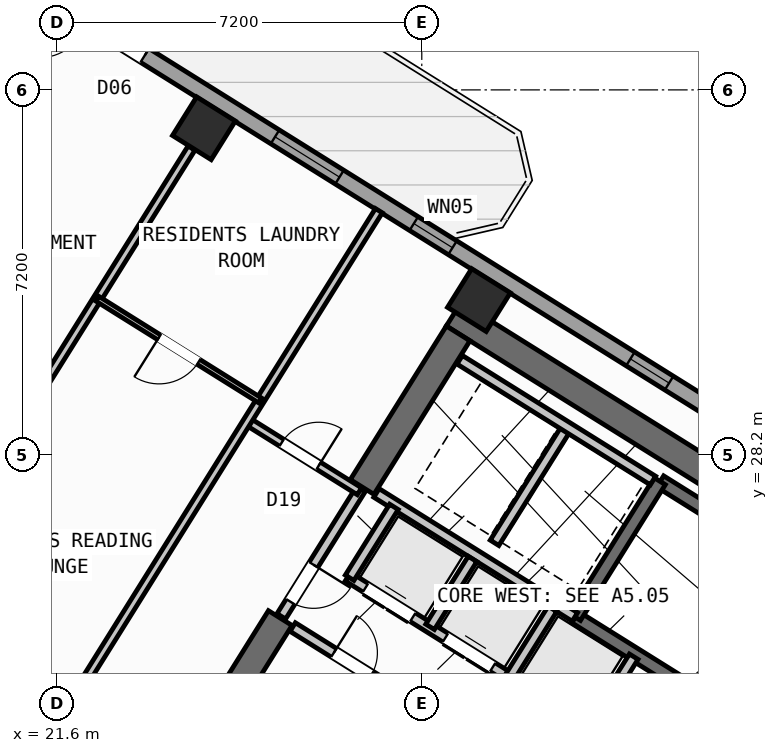
"""IFC4 building model, lengths in metres.
Left out: names, types, materials, properties, quantities, classifications, styles, units other than length and angle.
Written with IfcOpenShell. Run it as: python <this file> out.ifc"""

import sys

from ifc_helpers import new_model, si_unit, direction, frame, frame_2d, origin, origin_2d, place, context, subcontext, project, spatial, rectangle, hollow_rectangle, extrude, source, transform, mapped, element, fill, save


model = new_model("IFC4")
c1 = context("Model", 3, precision=1e-05, world=origin(), true_north=direction((0.0, 1.0)))
c2 = subcontext(c1, "Body", "Model", "MODEL_VIEW")
j1 = project(units=[si_unit("LENGTHUNIT", "METRE"), si_unit("PLANEANGLEUNIT", "RADIAN")], contexts=[c1])
p1 = place(None, origin())
s1 = spatial("IfcSite", under=j1, at=p1, CompositionType="ELEMENT")
p2 = place(p1, origin())
s2 = spatial("IfcBuilding", under=s1, at=p2, CompositionType="ELEMENT")
p3 = place(p2, frame((0.0, 0.0, 158.7)))
s3 = spatial("IfcBuildingStorey", under=s2, at=p3, CompositionType="ELEMENT", Elevation=158.7)
p4 = place(p3, frame((40.573, 24.01, 0.0), z_axis=(0.0, 0.0, 1.0), x_axis=(-0.848047359947, 0.529920442413, 0.0)))
e1 = element("IfcWall", 1, at=p4, inside=s3, PredefinedType="SHEAR", context=c2, shape_type="SweptSolid", body=[
    extrude(rectangle(XDim=13.14, YDim=0.55, at=frame_2d((6.57, 0.0))), origin(), (0.0, 0.0, 1.0), 3.35),
])
p5 = place(p3, frame((29.517, 30.594, 0.0), z_axis=(0.0, 0.0, 1.0), x_axis=(-0.529906864564, -0.848055844204, 0.0)))
e2 = element("IfcWall", 2, at=p5, inside=s3, PredefinedType="SHEAR", context=c2, shape_type="SweptSolid", body=[
    extrude(rectangle(XDim=3.575, YDim=0.55, at=frame_2d((1.788, 0.0))), origin(), (0.0, 0.0, 1.0), 3.35),
])
p6 = place(p3, frame((26.007, 24.976, 0.0), z_axis=(0.0, 0.0, 1.0), x_axis=(-0.529923795287, -0.848045264823, 0.0)))
e3 = element("IfcWall", 3, at=p6, inside=s3, PredefinedType="SHEAR", context=c2, shape_type="SweptSolid", body=[
    extrude(rectangle(XDim=6.425, YDim=0.55, at=frame_2d((3.212, 0.0))), origin(), (0.0, 0.0, 1.0), 3.35),
])
m1 = source(origin(), c2, "Body", "SweptSolid", [
    extrude(hollow_rectangle(XDim=0.9, YDim=0.9, WallThickness=0.036, at=origin_2d()), origin(), (0.0, 0.0, 1.0), 3.6),
])
for number, where, z_axis, x_axis in (
    (4, (29.928, 31.251, 0.0), (0.0, 0.0, 1.0), (-0.848, 0.53, 0.0)),
    (5, (24.5, 34.643, 0.0), (0.0, 0.0, 1.0), (-0.848, 0.53, 0.0)),
):
    element("IfcColumn", number, at=place(p3, frame(where, z_axis=z_axis, x_axis=x_axis)), inside=s3, PredefinedType="COLUMN", context=c2, shape_type="MappedRepresentation", body=[
        mapped(m1, transform((0.0, 0.0, 0.0), scale=1.0)),
    ])
p7 = place(p3, frame((14.138, 41.825, 0.0), z_axis=(0.0, 0.0, 1.0), x_axis=(0.848046498049, -0.529921821731, 0.0)))
e6 = element("IfcWall", 6, at=p7, inside=s3, PredefinedType="STANDARD", context=c2, shape_type="SweptSolid", body=[
    extrude(rectangle(XDim=31.588, YDim=0.32, at=frame_2d((15.794, 0.0))), origin(), (0.0, 0.0, 1.0), 3.35),
])
p8 = place(p7, frame((9.792, 0.0, 0.0)))
e7 = element("IfcOpeningElement", 7, at=p8, cuts=e6, PredefinedType="OPENING", context=c2, shape_type="SweptSolid", body=[
    extrude(rectangle(XDim=1.05, YDim=2.15, at=frame_2d((0.525, 1.075))), frame((0.0, 0.17, 0.0), z_axis=(0.0, -1.0, 0.0), x_axis=(1.0, 0.0, 0.0)), (0.0, 0.0, 1.0), 0.34),
])
p9 = place(p7, frame((0.791, 0.0, 0.85)))
e8 = element("IfcOpeningElement", 8, at=p9, cuts=e6, PredefinedType="OPENING", context=c2, shape_type="SweptSolid", body=[
    extrude(rectangle(XDim=1.8, YDim=1.5, at=frame_2d((0.9, 0.75))), frame((0.0, 0.17, 0.0), z_axis=(0.0, -1.0, 0.0), x_axis=(1.0, 0.0, 0.0)), (0.0, 0.0, 1.0), 0.34),
])
p10 = place(p7, frame((3.996, 0.0, 0.95)))
e9 = element("IfcOpeningElement", 9, at=p10, cuts=e6, PredefinedType="OPENING", context=c2, shape_type="SweptSolid", body=[
    extrude(rectangle(XDim=1.2, YDim=1.4, at=frame_2d((0.6, 0.7))), frame((0.0, 0.17, 0.0), z_axis=(0.0, -1.0, 0.0), x_axis=(1.0, 0.0, 0.0)), (0.0, 0.0, 1.0), 0.34),
])
p11 = place(p7, frame((13.874, 0.0, 0.85)))
e10 = element("IfcOpeningElement", 10, at=p11, cuts=e6, PredefinedType="OPENING", context=c2, shape_type="SweptSolid", body=[
    extrude(rectangle(XDim=1.5, YDim=1.5, at=frame_2d((0.75, 0.75))), frame((0.0, 0.17, 0.0), z_axis=(0.0, -1.0, 0.0), x_axis=(1.0, 0.0, 0.0)), (0.0, 0.0, 1.0), 0.34),
])
p12 = place(p7, frame((17.104, 0.0, 1.0)))
e11 = element("IfcOpeningElement", 11, at=p12, cuts=e6, PredefinedType="OPENING", context=c2, shape_type="SweptSolid", body=[
    extrude(rectangle(XDim=0.9, YDim=1.25, at=frame_2d((0.45, 0.625))), frame((0.0, 0.17, 0.0), z_axis=(0.0, -1.0, 0.0), x_axis=(1.0, 0.0, 0.0)), (0.0, 0.0, 1.0), 0.34),
])
p13 = place(p7, frame((22.144, 0.0, 1.0)))
e12 = element("IfcOpeningElement", 12, at=p13, cuts=e6, PredefinedType="OPENING", context=c2, shape_type="SweptSolid", body=[
    extrude(rectangle(XDim=0.9, YDim=1.25, at=frame_2d((0.45, 0.625))), frame((0.0, 0.17, 0.0), z_axis=(0.0, -1.0, 0.0), x_axis=(1.0, 0.0, 0.0)), (0.0, 0.0, 1.0), 0.34),
])
p14 = place(p7, frame((27.744, 0.0, 1.0)))
e13 = element("IfcOpeningElement", 13, at=p14, cuts=e6, PredefinedType="OPENING", context=c2, shape_type="SweptSolid", body=[
    extrude(rectangle(XDim=0.9, YDim=1.25, at=frame_2d((0.45, 0.625))), frame((0.0, 0.17, 0.0), z_axis=(0.0, -1.0, 0.0), x_axis=(1.0, 0.0, 0.0)), (0.0, 0.0, 1.0), 0.34),
])
p15 = place(p3, frame((39.721, 23.788, 0.0), z_axis=(0.0, 0.0, 1.0), x_axis=(-0.848054434086, 0.529909121291, 0.0)))
e14 = element("IfcWall", 14, at=p15, inside=s3, PredefinedType="SHEAR", context=c2, shape_type="SweptSolid", body=[
    extrude(rectangle(XDim=7.33, YDim=0.26, at=frame_2d((3.665, 0.0))), origin(), (0.0, 0.0, 1.0), 3.35),
])
p16 = place(p3, frame((38.046, 21.108, 0.0), z_axis=(0.0, 0.0, 1.0), x_axis=(-0.848054434086, 0.529909121291, 0.0)))
e15 = element("IfcWall", 15, at=p16, inside=s3, PredefinedType="SHEAR", context=c2, shape_type="SweptSolid", body=[
    extrude(rectangle(XDim=7.33, YDim=0.26, at=frame_2d((3.665, 0.0))), origin(), (0.0, 0.0, 1.0), 3.35),
])
p17 = place(p16, frame((0.22, 0.0, 0.0)))
e16 = element("IfcOpeningElement", 16, at=p17, cuts=e15, PredefinedType="OPENING", context=c2, shape_type="SweptSolid", body=[
    extrude(rectangle(XDim=1.1, YDim=2.1, at=frame_2d((0.55, 1.05))), frame((0.0, 0.14, 0.0), z_axis=(0.0, -1.0, 0.0), x_axis=(1.0, 0.0, 0.0)), (0.0, 0.0, 1.0), 0.28),
])
p18 = place(p3, frame((33.496, 27.677, 0.0), z_axis=(0.0, 0.0, 1.0), x_axis=(-0.529908658664, -0.84805472316, 0.0)))
e17 = element("IfcWall", 17, at=p18, inside=s3, PredefinedType="SHEAR", context=c2, shape_type="SweptSolid", body=[
    extrude(rectangle(XDim=3.16, YDim=0.26, at=frame_2d((1.58, 0.0))), origin(), (0.0, 0.0, 1.0), 3.35),
])
p19 = place(p3, frame((31.822, 24.998, 0.0), z_axis=(0.0, 0.0, 1.0), x_axis=(-0.848036912365, 0.52993716162, 0.0)))
e18 = element("IfcWall", 18, at=p19, inside=s3, PredefinedType="STANDARD", context=c2, shape_type="SweptSolid", body=[
    extrude(rectangle(XDim=4.618, YDim=0.2, at=frame_2d((2.309, 0.0))), origin(), (0.0, 0.0, 1.0), 3.34),
])
p20 = place(p3, frame((32.108, 22.814, 0.0), z_axis=(0.0, 0.0, 1.0), x_axis=(-0.848042229521, 0.529928652696, 0.0)))
e19 = element("IfcWall", 19, at=p20, inside=s3, PredefinedType="STANDARD", context=c2, shape_type="SweptSolid", body=[
    extrude(rectangle(XDim=5.62, YDim=0.2, at=frame_2d((2.81, 0.0))), origin(), (0.0, 0.0, 1.0), 3.34),
])
p21 = place(p20, frame((0.39, 0.0, 0.0)))
e20 = element("IfcOpeningElement", 20, at=p21, cuts=e19, PredefinedType="OPENING", context=c2, shape_type="SweptSolid", body=[
    extrude(rectangle(XDim=1.1, YDim=2.15, at=frame_2d((0.55, 1.075))), frame((0.0, 0.11, 0.0), z_axis=(0.0, -1.0, 0.0), x_axis=(1.0, 0.0, 0.0)), (0.0, 0.0, 1.0), 0.22),
])
p22 = place(p20, frame((2.25, 0.0, 0.0)))
e21 = element("IfcOpeningElement", 21, at=p22, cuts=e19, PredefinedType="OPENING", context=c2, shape_type="SweptSolid", body=[
    extrude(rectangle(XDim=1.1, YDim=2.15, at=frame_2d((0.55, 1.075))), frame((0.0, 0.11, 0.0), z_axis=(0.0, -1.0, 0.0), x_axis=(1.0, 0.0, 0.0)), (0.0, 0.0, 1.0), 0.22),
])
p23 = place(p20, frame((4.11, 0.0, 0.0)))
e22 = element("IfcOpeningElement", 22, at=p23, cuts=e19, PredefinedType="OPENING", context=c2, shape_type="SweptSolid", body=[
    extrude(rectangle(XDim=1.1, YDim=2.15, at=frame_2d((0.55, 1.075))), frame((0.0, 0.11, 0.0), z_axis=(0.0, -1.0, 0.0), x_axis=(1.0, 0.0, 0.0)), (0.0, 0.0, 1.0), 0.22),
])
p24 = place(p3, frame((32.982, 24.213, 0.0), z_axis=(0.0, 0.0, 1.0), x_axis=(-0.529839334948, -0.84809803628, 0.0)))
e23 = element("IfcWall", 23, at=p24, inside=s3, PredefinedType="STANDARD", context=c2, shape_type="SweptSolid", body=[
    extrude(rectangle(XDim=1.65, YDim=0.2, at=frame_2d((0.825, 0.0))), origin(), (0.0, 0.0, 1.0), 3.34),
])
p25 = place(p3, frame((28.25, 27.17, 0.0), z_axis=(0.0, 0.0, 1.0), x_axis=(-0.529905827651, -0.848056492117, 0.0)))
e24 = element("IfcWall", 24, at=p25, inside=s3, PredefinedType="STANDARD", context=c2, shape_type="SweptSolid", body=[
    extrude(rectangle(XDim=1.65, YDim=0.2, at=frame_2d((0.825, 0.0))), origin(), (0.0, 0.0, 1.0), 3.34),
])
p26 = place(p3, frame((31.645, 28.716, 0.0), z_axis=(0.0, 0.0, 1.0), x_axis=(-0.52986693015, -0.848080795876, 0.0)))
e25 = element("IfcWall", 25, at=p26, inside=s3, PredefinedType="STANDARD", context=c2, shape_type="SweptSolid", body=[
    extrude(rectangle(XDim=2.66, YDim=0.2, at=frame_2d((1.33, 0.0))), origin(), (0.0, 0.0, 1.0), 3.34),
])
p27 = place(p3, frame((33.363, 27.69, 0.0), z_axis=(0.0, 0.0, 1.0), x_axis=(-0.848047090064, 0.529920874315, 0.0)))
e26 = element("IfcWall", 26, at=p27, inside=s3, PredefinedType="STANDARD", context=c2, shape_type="SweptSolid", body=[
    extrude(rectangle(XDim=4.498, YDim=0.2, at=frame_2d((2.249, 0.0))), origin(), (0.0, 0.0, 1.0), 3.34),
])
for number, where, z_axis, x_axis in (
    (27, (31.379, 25.156, 0.0), (0.0, 0.0, 1.0), (-0.53, -0.848, 0.0)),
    (28, (29.801, 26.142, 0.0), (0.0, 0.0, 1.0), (-0.53, -0.848, 0.0)),
):
    element("IfcWall", number, at=place(p3, frame(where, z_axis=z_axis, x_axis=x_axis)), inside=s3, PredefinedType="STANDARD", context=c2, shape_type="SweptSolid", body=[
        extrude(rectangle(XDim=1.58, YDim=0.2, at=frame_2d((0.79, 0.0))), origin(), (0.0, 0.0, 1.0), 3.34),
    ])
p28 = place(p3, frame((31.525, 21.504, 0.0), z_axis=(0.0, 0.0, 1.0), x_axis=(-0.848040211232, 0.529931882541, 0.0)))
e29 = element("IfcWall", 29, at=p28, inside=s3, PredefinedType="STANDARD", context=c2, shape_type="SweptSolid", body=[
    extrude(rectangle(XDim=6.218, YDim=0.2, at=frame_2d((3.109, 0.0))), origin(), (0.0, 0.0, 1.0), 3.34),
])
p29 = place(p28, frame((4.4, 0.0, 0.0)))
e30 = element("IfcOpeningElement", 30, at=p29, cuts=e29, PredefinedType="OPENING", context=c2, shape_type="SweptSolid", body=[
    extrude(rectangle(XDim=0.86, YDim=2.05, at=frame_2d((0.43, 1.025))), frame((0.0, 0.11, 0.0), z_axis=(0.0, -1.0, 0.0), x_axis=(1.0, 0.0, 0.0)), (0.0, 0.0, 1.0), 0.22),
])
p30 = place(p28, frame((0.35, 0.0, 0.0)))
e31 = element("IfcOpeningElement", 31, at=p30, cuts=e29, PredefinedType="OPENING", context=c2, shape_type="SweptSolid", body=[
    extrude(rectangle(XDim=0.86, YDim=2.05, at=frame_2d((0.43, 1.025))), frame((0.0, 0.11, 0.0), z_axis=(0.0, -1.0, 0.0), x_axis=(1.0, 0.0, 0.0)), (0.0, 0.0, 1.0), 0.22),
])
p31 = place(p3, frame((27.596, 27.52, 0.0), z_axis=(0.0, 0.0, 1.0), x_axis=(-0.529865479138, -0.848081702443, 0.0)))
e32 = element("IfcWall", 32, at=p31, inside=s3, PredefinedType="STANDARD", context=c2, shape_type="SweptSolid", body=[
    extrude(rectangle(XDim=2.96, YDim=0.2, at=frame_2d((1.48, 0.0))), origin(), (0.0, 0.0, 1.0), 3.34),
])
p32 = place(p31, frame((1.76, 0.0, 0.0)))
e33 = element("IfcOpeningElement", 33, at=p32, cuts=e32, PredefinedType="OPENING", context=c2, shape_type="SweptSolid", body=[
    extrude(rectangle(XDim=0.86, YDim=2.05, at=frame_2d((0.43, 1.025))), frame((0.0, 0.11, 0.0), z_axis=(0.0, -1.0, 0.0), x_axis=(1.0, 0.0, 0.0)), (0.0, 0.0, 1.0), 0.22),
])
p33 = place(p3, frame((27.57, 27.478, 0.0), z_axis=(0.0, 0.0, 1.0), x_axis=(-0.848050851465, 0.529914854792, 0.0)))
e34 = element("IfcWall", 34, at=p33, inside=s3, PredefinedType="PARTITIONING", context=c2, shape_type="SweptSolid", body=[
    extrude(rectangle(XDim=2.61, YDim=0.16, at=frame_2d((1.305, 0.0))), origin(), (0.0, 0.0, 1.0), 3.34),
])
p34 = place(p33, frame((0.95, 0.0, 0.0)))
e35 = element("IfcOpeningElement", 35, at=p34, cuts=e34, PredefinedType="OPENING", context=c2, shape_type="SweptSolid", body=[
    extrude(rectangle(XDim=0.86, YDim=2.05, at=frame_2d((0.43, 1.025))), frame((0.0, 0.09, 0.0), z_axis=(0.0, -1.0, 0.0), x_axis=(1.0, 0.0, 0.0)), (0.0, 0.0, 1.0), 0.18),
])
p35 = place(p3, frame((27.953, 33.016, 0.0), z_axis=(0.0, 0.0, 1.0), x_axis=(-0.529905022231, -0.848056995381, 0.0)))
e36 = element("IfcWall", 36, at=p35, inside=s3, PredefinedType="PARTITIONING", context=c2, shape_type="SweptSolid", body=[
    extrude(rectangle(XDim=11.45, YDim=0.16, at=frame_2d((5.725, 0.0))), origin(), (0.0, 0.0, 1.0), 3.34),
])
p36 = place(p3, frame((21.885, 23.306, 0.0), z_axis=(0.0, 0.0, 1.0), x_axis=(-0.848052408131, 0.529912363569, 0.0)))
e37 = element("IfcWall", 37, at=p36, inside=s3, PredefinedType="PARTITIONING", context=c2, shape_type="SweptSolid", body=[
    extrude(rectangle(XDim=16.73, YDim=0.16, at=frame_2d((8.365, 0.0))), origin(), (0.0, 0.0, 1.0), 3.34),
])
p37 = place(p36, frame((1.395, 0.0, 0.0)))
e38 = element("IfcOpeningElement", 38, at=p37, cuts=e37, PredefinedType="OPENING", context=c2, shape_type="SweptSolid", body=[
    extrude(rectangle(XDim=1.0, YDim=2.1, at=frame_2d((0.5, 1.05))), frame((0.0, 0.09, 0.0), z_axis=(0.0, -1.0, 0.0), x_axis=(1.0, 0.0, 0.0)), (0.0, 0.0, 1.0), 0.18),
])
p38 = place(p36, frame((7.82, 0.0, 0.0)))
e39 = element("IfcOpeningElement", 39, at=p38, cuts=e37, PredefinedType="OPENING", context=c2, shape_type="SweptSolid", body=[
    extrude(rectangle(XDim=1.0, YDim=2.1, at=frame_2d((0.5, 1.05))), frame((0.0, 0.09, 0.0), z_axis=(0.0, -1.0, 0.0), x_axis=(1.0, 0.0, 0.0)), (0.0, 0.0, 1.0), 0.18),
])
p39 = place(p36, frame((11.14, 0.0, 0.0)))
e40 = element("IfcOpeningElement", 40, at=p39, cuts=e37, PredefinedType="OPENING", context=c2, shape_type="SweptSolid", body=[
    extrude(rectangle(XDim=1.0, YDim=2.1, at=frame_2d((0.5, 1.05))), frame((0.0, 0.09, 0.0), z_axis=(0.0, -1.0, 0.0), x_axis=(1.0, 0.0, 0.0)), (0.0, 0.0, 1.0), 0.18),
])
p40 = place(p3, frame((24.256, 34.251, 0.0), z_axis=(0.0, 0.0, 1.0), x_axis=(-0.529919772691, -0.848047778437, 0.0)))
e41 = element("IfcWall", 41, at=p40, inside=s3, PredefinedType="PARTITIONING", context=c2, shape_type="SweptSolid", body=[
    extrude(rectangle(XDim=6.376, YDim=0.16, at=frame_2d((3.188, 0.0))), origin(), (0.0, 0.0, 1.0), 2.775),
])
p41 = place(p3, frame((25.612, 29.269, 0.0), z_axis=(0.0, 0.0, 1.0), x_axis=(-0.84803087207, 0.529946827537, 0.0)))
e42 = element("IfcWall", 42, at=p41, inside=s3, PredefinedType="PARTITIONING", context=c2, shape_type="SweptSolid", body=[
    extrude(rectangle(XDim=3.79, YDim=0.11, at=frame_2d((1.895, 0.0))), origin(), (0.0, 0.0, 1.0), 3.34),
])
p42 = place(p41, frame((1.435, 0.0, 0.0)))
e43 = element("IfcOpeningElement", 43, at=p42, cuts=e42, PredefinedType="OPENING", context=c2, shape_type="SweptSolid", body=[
    extrude(rectangle(XDim=0.92, YDim=2.08, at=frame_2d((0.46, 1.04))), frame((0.0, 0.065, 0.0), z_axis=(0.0, -1.0, 0.0), x_axis=(1.0, 0.0, 0.0)), (0.0, 0.0, 1.0), 0.13),
])
p43 = place(p3, frame((21.517, 37.356, 0.0), z_axis=(0.0, 0.0, 1.0), x_axis=(-0.529919705034, -0.848047820713, 0.0)))
e44 = element("IfcWall", 44, at=p43, inside=s3, PredefinedType="PARTITIONING", context=c2, shape_type="SweptSolid", body=[
    extrude(rectangle(XDim=9.14, YDim=0.11, at=frame_2d((4.57, 0.0))), origin(), (0.0, 0.0, 1.0), 3.34),
])
p44 = place(p43, frame((0.47, 0.0, 0.0)))
e45 = element("IfcOpeningElement", 45, at=p44, cuts=e44, PredefinedType="OPENING", context=c2, shape_type="SweptSolid", body=[
    extrude(rectangle(XDim=0.92, YDim=2.08, at=frame_2d((0.46, 1.04))), frame((0.0, 0.065, 0.0), z_axis=(0.0, -1.0, 0.0), x_axis=(1.0, 0.0, 0.0)), (0.0, 0.0, 1.0), 0.13),
])
m2 = source(origin(), c2, "Body", "SweptSolid", [
    extrude(rectangle(XDim=1.05, YDim=2.15, at=frame_2d((0.525, 1.075))), frame((0.0, 0.025, 0.0), z_axis=(0.0, -1.0, 0.0), x_axis=(1.0, 0.0, 0.0)), (0.0, 0.0, 1.0), 0.05),
])
p45 = place(p8, origin())
e46 = element("IfcDoor", 46, at=p45, inside=s3, OperationType="SINGLE_SWING_RIGHT", PredefinedType="DOOR", context=c2, shape_type="MappedRepresentation", body=[
    mapped(m2, transform((0.0, 0.0, 0.0), scale=1.0)),
])
fill(e7, e46)
m3 = source(origin(), c2, "Body", "SweptSolid", [
    extrude(rectangle(XDim=1.5, YDim=1.5, at=frame_2d((0.75, 0.75))), frame((0.0, 0.03, 0.0), z_axis=(0.0, -1.0, 0.0), x_axis=(1.0, 0.0, 0.0)), (0.0, 0.0, 1.0), 0.06),
])
p46 = place(p11, origin())
e47 = element("IfcWindow", 47, at=p46, inside=s3, PartitioningType="SINGLE_PANEL", PredefinedType="WINDOW", context=c2, shape_type="MappedRepresentation", body=[
    mapped(m3, transform((0.0, 0.0, 0.0), scale=1.0)),
])
fill(e10, e47)
m4 = source(origin(), c2, "Body", "SweptSolid", [
    extrude(rectangle(XDim=0.9, YDim=1.25, at=frame_2d((0.45, 0.625))), frame((0.0, 0.03, 0.0), z_axis=(0.0, -1.0, 0.0), x_axis=(1.0, 0.0, 0.0)), (0.0, 0.0, 1.0), 0.06),
])
p47 = place(p12, origin())
e48 = element("IfcWindow", 48, at=p47, inside=s3, PartitioningType="SINGLE_PANEL", PredefinedType="WINDOW", context=c2, shape_type="MappedRepresentation", body=[
    mapped(m4, transform((0.0, 0.0, 0.0), scale=1.0)),
])
fill(e11, e48)
p48 = place(p13, origin())
e49 = element("IfcWindow", 49, at=p48, inside=s3, PartitioningType="SINGLE_PANEL", PredefinedType="WINDOW", context=c2, shape_type="MappedRepresentation", body=[
    mapped(m4, transform((0.0, 0.0, 0.0), scale=1.0)),
])
fill(e12, e49)
m5 = source(origin(), c2, "Body", "SweptSolid", [
    extrude(rectangle(XDim=1.1, YDim=2.15, at=frame_2d((0.55, 1.075))), frame((0.0, 0.025, 0.0), z_axis=(0.0, -1.0, 0.0), x_axis=(1.0, 0.0, 0.0)), (0.0, 0.0, 1.0), 0.05),
])
p49 = place(p22, origin())
e50 = element("IfcDoor", 50, at=p49, inside=s3, OperationType="DOUBLE_DOOR_SLIDING", PredefinedType="DOOR", context=c2, shape_type="MappedRepresentation", body=[
    mapped(m5, transform((0.0, 0.0, 0.0), scale=1.0)),
])
fill(e21, e50)
p50 = place(p23, origin())
e51 = element("IfcDoor", 51, at=p50, inside=s3, OperationType="DOUBLE_DOOR_SLIDING", PredefinedType="DOOR", context=c2, shape_type="MappedRepresentation", body=[
    mapped(m5, transform((0.0, 0.0, 0.0), scale=1.0)),
])
fill(e22, e51)
m6 = source(origin(), c2, "Body", "SweptSolid", [
    extrude(rectangle(XDim=0.86, YDim=2.05, at=frame_2d((0.43, 1.025))), frame((0.0, 0.025, 0.0), z_axis=(0.0, -1.0, 0.0), x_axis=(1.0, 0.0, 0.0)), (0.0, 0.0, 1.0), 0.05),
])
p51 = place(p29, frame((0.86, 0.0, 0.0), z_axis=(0.0, 0.0, 1.0), x_axis=(-1.0, 0.0, 0.0)))
e52 = element("IfcDoor", 52, at=p51, inside=s3, OperationType="SINGLE_SWING_LEFT", PredefinedType="DOOR", context=c2, shape_type="MappedRepresentation", body=[
    mapped(m6, transform((0.0, 0.0, 0.0), scale=1.0)),
])
fill(e30, e52)
p52 = place(p34, frame((0.86, 0.0, 0.0), z_axis=(0.0, 0.0, 1.0), x_axis=(-1.0, 0.0, 0.0)))
e53 = element("IfcDoor", 53, at=p52, inside=s3, OperationType="SINGLE_SWING_RIGHT", PredefinedType="DOOR", context=c2, shape_type="MappedRepresentation", body=[
    mapped(m6, transform((0.0, 0.0, 0.0), scale=1.0)),
])
fill(e35, e53)
p53 = place(p32, origin())
e54 = element("IfcDoor", 54, at=p53, inside=s3, OperationType="SINGLE_SWING_LEFT", PredefinedType="DOOR", context=c2, shape_type="MappedRepresentation", body=[
    mapped(m6, transform((0.0, 0.0, 0.0), scale=1.0)),
])
fill(e33, e54)
m7 = source(origin(), c2, "Body", "SweptSolid", [
    extrude(rectangle(XDim=0.92, YDim=2.08, at=frame_2d((0.46, 1.04))), frame((0.0, 0.025, 0.0), z_axis=(0.0, -1.0, 0.0), x_axis=(1.0, 0.0, 0.0)), (0.0, 0.0, 1.0), 0.05),
])
p54 = place(p42, origin())
e55 = element("IfcDoor", 55, at=p54, inside=s3, OperationType="SINGLE_SWING_RIGHT", PredefinedType="DOOR", context=c2, shape_type="MappedRepresentation", body=[
    mapped(m7, transform((0.0, 0.0, 0.0), scale=1.0)),
])
fill(e43, e55)
save(model, sys.argv[1])
